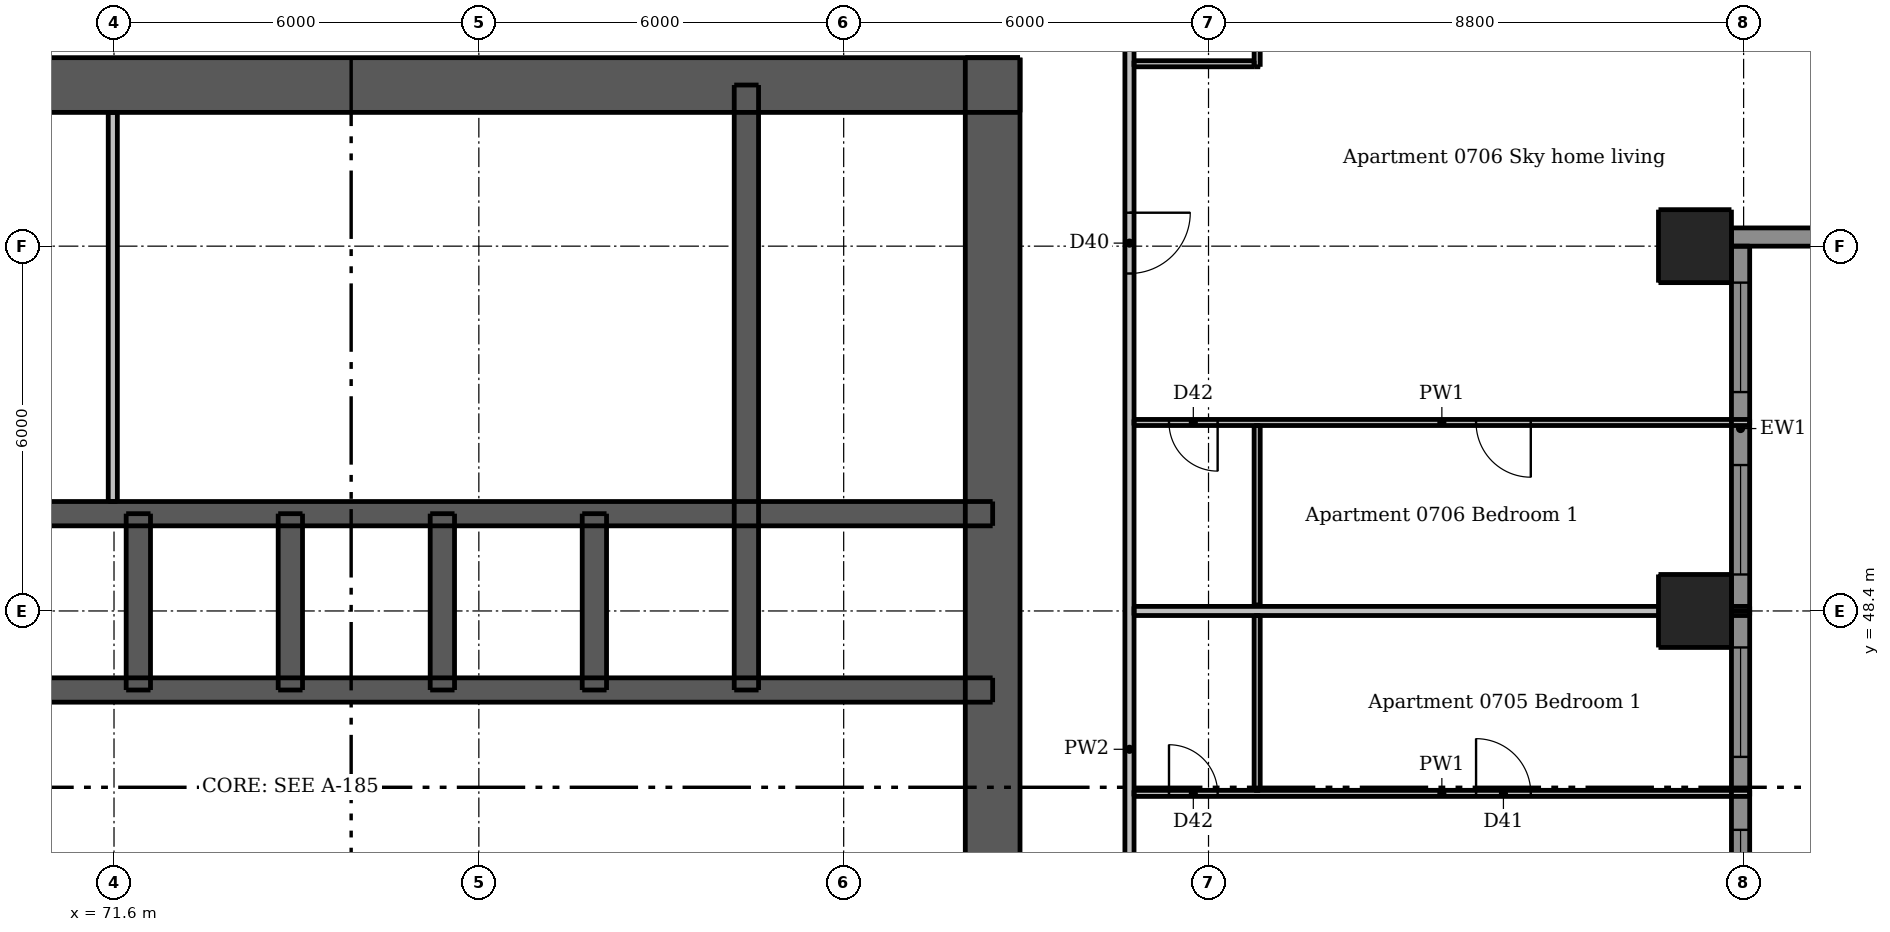
"""IFC4 building model, lengths in metres.
Left out: names, types, materials, properties, quantities, classifications, styles, units other than length and angle.
Written with IfcOpenShell. Run it as: python <this file> out.ifc"""

import sys

from ifc_helpers import new_model, si_unit, direction, frame, frame_2d, origin, origin_2d, place, context, subcontext, project, spatial, rectangle, extrude, element, fill, save


model = new_model("IFC4")
c1 = context("Model", 3, precision=1e-05, world=origin(), true_north=direction((0.0, 1.0)))
c2 = subcontext(c1, "Body", "Model", "MODEL_VIEW")
j1 = project(units=[si_unit("LENGTHUNIT", "METRE"), si_unit("PLANEANGLEUNIT", "RADIAN")], contexts=[c1])
p1 = place(None, origin())
s1 = spatial("IfcSite", under=j1, at=p1, CompositionType="ELEMENT")
p2 = place(p1, origin())
s2 = spatial("IfcBuilding", under=s1, at=p2, CompositionType="ELEMENT")
p3 = place(p2, frame((0.0, 0.0, 30.1)))
s3 = spatial("IfcBuildingStorey", under=s2, at=p3, CompositionType="ELEMENT", Elevation=30.1)
p4 = place(p3, frame((62.5, 57.05, 0.0), z_axis=(0.0, 0.0, 1.0), x_axis=(1.0, 0.0, 0.0)))
e1 = element("IfcWall", 1, at=p4, inside=s3, PredefinedType="SHEAR", context=c2, shape_type="SweptSolid", body=[
    extrude(rectangle(XDim=24.0, YDim=0.9, at=frame_2d((12.0, 0.0))), origin(), (0.0, 0.0, 1.0), 3.05),
])
p5 = place(p4, frame((20.85, 0.0, 0.0)))
e2 = element("IfcOpeningElement", 2, at=p5, cuts=e1, PredefinedType="OPENING", context=c2, shape_type="SweptSolid", body=[
    extrude(rectangle(XDim=1.1, YDim=2.1, at=frame_2d((0.55, 1.05))), frame((0.0, 0.46, 0.0), z_axis=(0.0, -1.0, 0.0), x_axis=(1.0, 0.0, 0.0)), (0.0, 0.0, 1.0), 0.92),
])
p6 = place(p4, frame((2.05, 0.0, 0.0)))
e3 = element("IfcOpeningElement", 3, at=p6, cuts=e1, PredefinedType="OPENING", context=c2, shape_type="SweptSolid", body=[
    extrude(rectangle(XDim=1.1, YDim=2.1, at=frame_2d((0.55, 1.05))), frame((0.0, 0.46, 0.0), z_axis=(0.0, -1.0, 0.0), x_axis=(1.0, 0.0, 0.0)), (0.0, 0.0, 1.0), 0.92),
])
p7 = place(p4, frame((6.44, 0.0, 0.0)))
e4 = element("IfcOpeningElement", 4, at=p7, cuts=e1, PredefinedType="OPENING", context=c2, shape_type="SweptSolid", body=[
    extrude(rectangle(XDim=0.9, YDim=2.1, at=frame_2d((0.45, 1.05))), frame((0.0, 0.46, 0.0), z_axis=(0.0, -1.0, 0.0), x_axis=(1.0, 0.0, 0.0)), (0.0, 0.0, 1.0), 0.92),
])
p8 = place(p4, frame((13.74, 0.0, 0.0)))
e5 = element("IfcOpeningElement", 5, at=p8, cuts=e1, PredefinedType="OPENING", context=c2, shape_type="SweptSolid", body=[
    extrude(rectangle(XDim=0.9, YDim=2.1, at=frame_2d((0.45, 1.05))), frame((0.0, 0.46, 0.0), z_axis=(0.0, -1.0, 0.0), x_axis=(1.0, 0.0, 0.0)), (0.0, 0.0, 1.0), 0.92),
])
p9 = place(p3, frame((86.05, 33.5, 0.0), z_axis=(0.0, 0.0, 1.0), x_axis=(0.0, 1.0, 0.0)))
e6 = element("IfcWall", 6, at=p9, inside=s3, PredefinedType="SHEAR", context=c2, shape_type="SweptSolid", body=[
    extrude(rectangle(XDim=24.0, YDim=0.9, at=frame_2d((12.0, 0.0))), origin(), (0.0, 0.0, 1.0), 3.05),
])
p10 = place(p9, frame((11.2, 0.0, 0.0)))
e7 = element("IfcOpeningElement", 7, at=p10, cuts=e6, PredefinedType="OPENING", context=c2, shape_type="SweptSolid", body=[
    extrude(rectangle(XDim=1.6, YDim=2.1, at=frame_2d((0.8, 1.05))), frame((0.0, 0.46, 0.0), z_axis=(0.0, -1.0, 0.0), x_axis=(1.0, 0.0, 0.0)), (0.0, 0.0, 1.0), 0.92),
])
p11 = place(p3, frame((62.95, 47.1, 0.0), z_axis=(0.0, 0.0, 1.0), x_axis=(1.0, 0.0, 0.0)))
e8 = element("IfcWall", 8, at=p11, inside=s3, PredefinedType="SHEAR", context=c2, shape_type="SweptSolid", body=[
    extrude(rectangle(XDim=23.1, YDim=0.4, at=frame_2d((11.55, 0.0))), origin(), (0.0, 0.0, 1.0), 3.05),
])
p12 = place(p11, frame((0.85, 0.0, 0.0)))
e9 = element("IfcOpeningElement", 9, at=p12, cuts=e8, PredefinedType="OPENING", context=c2, shape_type="SweptSolid", body=[
    extrude(rectangle(XDim=0.9, YDim=2.1, at=frame_2d((0.45, 1.05))), frame((0.0, 0.21, 0.0), z_axis=(0.0, -1.0, 0.0), x_axis=(1.0, 0.0, 0.0)), (0.0, 0.0, 1.0), 0.42),
])
p13 = place(p11, frame((2.55, 0.0, 0.0)))
e10 = element("IfcOpeningElement", 10, at=p13, cuts=e8, PredefinedType="OPENING", context=c2, shape_type="SweptSolid", body=[
    extrude(rectangle(XDim=0.9, YDim=2.1, at=frame_2d((0.45, 1.05))), frame((0.0, 0.21, 0.0), z_axis=(0.0, -1.0, 0.0), x_axis=(1.0, 0.0, 0.0)), (0.0, 0.0, 1.0), 0.42),
])
p14 = place(p11, frame((20.5, 0.0, 0.0)))
e11 = element("IfcOpeningElement", 11, at=p14, cuts=e8, PredefinedType="OPENING", context=c2, shape_type="SweptSolid", body=[
    extrude(rectangle(XDim=0.9, YDim=2.1, at=frame_2d((0.45, 1.05))), frame((0.0, 0.21, 0.0), z_axis=(0.0, -1.0, 0.0), x_axis=(1.0, 0.0, 0.0)), (0.0, 0.0, 1.0), 0.42),
])
p15 = place(p3, frame((62.95, 50.0, 0.0), z_axis=(0.0, 0.0, 1.0), x_axis=(1.0, 0.0, 0.0)))
e12 = element("IfcWall", 12, at=p15, inside=s3, PredefinedType="SHEAR", context=c2, shape_type="SweptSolid", body=[
    extrude(rectangle(XDim=23.1, YDim=0.4, at=frame_2d((11.55, 0.0))), origin(), (0.0, 0.0, 1.0), 3.05),
])
p16 = place(p3, frame((82.0, 47.1, 0.0), z_axis=(0.0, 0.0, 1.0), x_axis=(0.0, 1.0, 0.0)))
e13 = element("IfcWall", 13, at=p16, inside=s3, PredefinedType="SHEAR", context=c2, shape_type="SweptSolid", body=[
    extrude(rectangle(XDim=9.95, YDim=0.4, at=frame_2d((4.975, 0.0))), origin(), (0.0, 0.0, 1.0), 3.05),
])
for number, where, z_axis, x_axis in (
    (14, (72.0, 47.1, 0.0), (0.0, 0.0, 1.0), (0.0, 1.0, 0.0)),
    (15, (74.5, 47.1, 0.0), (0.0, 0.0, 1.0), (0.0, 1.0, 0.0)),
    (16, (77.0, 47.1, 0.0), (0.0, 0.0, 1.0), (0.0, 1.0, 0.0)),
    (17, (79.5, 47.1, 0.0), (0.0, 0.0, 1.0), (0.0, 1.0, 0.0)),
):
    element("IfcWall", number, at=place(p3, frame(where, z_axis=z_axis, x_axis=x_axis)), inside=s3, PredefinedType="SHEAR", context=c2, shape_type="SweptSolid", body=[
        extrude(rectangle(XDim=2.9, YDim=0.4, at=frame_2d((1.45, 0.0))), origin(), (0.0, 0.0, 1.0), 3.05),
    ])
for number, where, z_axis, x_axis in (
    (18, (97.6, 48.4, 0.0), (0.0, 0.0, 1.0), (1.0, 0.0, 0.0)),
    (19, (97.6, 54.4, 0.0), (0.0, 0.0, 1.0), (1.0, 0.0, 0.0)),
):
    element("IfcColumn", number, at=place(p3, frame(where, z_axis=z_axis, x_axis=x_axis)), inside=s3, PredefinedType="COLUMN", context=c2, shape_type="SweptSolid", body=[
        extrude(rectangle(XDim=1.2, YDim=1.2, at=origin_2d()), origin(), (0.0, 0.0, 1.0), 3.05),
    ])
p17 = place(p3, frame((98.2, 54.55, 0.0), z_axis=(0.0, 0.0, 1.0), x_axis=(1.0, 0.0, 0.0)))
e20 = element("IfcWall", 20, at=p17, inside=s3, PredefinedType="SOLIDWALL", context=c2, shape_type="SweptSolid", body=[
    extrude(rectangle(XDim=1.8, YDim=0.3, at=frame_2d((0.9, 0.0))), origin(), (0.0, 0.0, 1.0), 3.05),
])
p18 = place(p3, frame((98.35, 42.7, 0.0), z_axis=(0.0, 0.0, 1.0), x_axis=(0.0, 1.0, 0.0)))
e21 = element("IfcWall", 21, at=p18, inside=s3, PredefinedType="SOLIDWALL", context=c2, shape_type="SweptSolid", body=[
    extrude(rectangle(XDim=5.7, YDim=0.3, at=frame_2d((2.85, 0.0))), origin(), (0.0, 0.0, 1.0), 3.05),
])
p19 = place(p18, frame((0.3, 0.0, 0.15)))
e22 = element("IfcOpeningElement", 22, at=p19, cuts=e21, PredefinedType="OPENING", context=c2, shape_type="SweptSolid", body=[
    extrude(rectangle(XDim=1.8, YDim=2.1, at=frame_2d((0.9, 1.05))), frame((0.0, 0.16, 0.0), z_axis=(0.0, -1.0, 0.0), x_axis=(1.0, 0.0, 0.0)), (0.0, 0.0, 1.0), 0.32),
])
p20 = place(p18, frame((3.3, 0.0, 0.15)))
e23 = element("IfcOpeningElement", 23, at=p20, cuts=e21, PredefinedType="OPENING", context=c2, shape_type="SweptSolid", body=[
    extrude(rectangle(XDim=1.8, YDim=2.1, at=frame_2d((0.9, 1.05))), frame((0.0, 0.16, 0.0), z_axis=(0.0, -1.0, 0.0), x_axis=(1.0, 0.0, 0.0)), (0.0, 0.0, 1.0), 0.32),
])
p21 = place(p3, frame((98.35, 48.4, 0.0), z_axis=(0.0, 0.0, 1.0), x_axis=(0.0, 1.0, 0.0)))
e24 = element("IfcWall", 24, at=p21, inside=s3, PredefinedType="SOLIDWALL", context=c2, shape_type="SweptSolid", body=[
    extrude(rectangle(XDim=6.0, YDim=0.3, at=frame_2d((3.0, 0.0))), origin(), (0.0, 0.0, 1.0), 3.05),
])
p22 = place(p21, frame((0.6, 0.0, 0.15)))
e25 = element("IfcOpeningElement", 25, at=p22, cuts=e24, PredefinedType="OPENING", context=c2, shape_type="SweptSolid", body=[
    extrude(rectangle(XDim=1.8, YDim=2.1, at=frame_2d((0.9, 1.05))), frame((0.0, 0.16, 0.0), z_axis=(0.0, -1.0, 0.0), x_axis=(1.0, 0.0, 0.0)), (0.0, 0.0, 1.0), 0.32),
])
p23 = place(p21, frame((3.6, 0.0, 0.15)))
e26 = element("IfcOpeningElement", 26, at=p23, cuts=e24, PredefinedType="OPENING", context=c2, shape_type="SweptSolid", body=[
    extrude(rectangle(XDim=1.8, YDim=2.1, at=frame_2d((0.9, 1.05))), frame((0.0, 0.16, 0.0), z_axis=(0.0, -1.0, 0.0), x_axis=(1.0, 0.0, 0.0)), (0.0, 0.0, 1.0), 0.32),
])
p24 = place(p3, frame((71.58, 50.2, 0.0), z_axis=(0.0, 0.0, 1.0), x_axis=(0.0, 1.0, 0.0)))
e27 = element("IfcWall", 27, at=p24, inside=s3, PredefinedType="PLUMBINGWALL", context=c2, shape_type="SweptSolid", body=[
    extrude(rectangle(XDim=6.4, YDim=0.15, at=frame_2d((3.2, 0.0))), origin(), (0.0, 0.0, 1.0), 3.05),
])
p25 = place(p3, frame((90.4, 45.45, 0.0), z_axis=(0.0, 0.0, 1.0), x_axis=(0.0, 1.0, 0.0)))
e28 = element("IfcWall", 28, at=p25, inside=s3, PredefinedType="PARTITIONING", context=c2, shape_type="SweptSolid", body=[
    extrude(rectangle(XDim=2.875, YDim=0.1, at=frame_2d((1.438, 0.0))), origin(), (0.0, 0.0, 1.0), 3.05),
])
p26 = place(p3, frame((90.4, 48.5, 0.0), z_axis=(0.0, 0.0, 1.0), x_axis=(0.0, 1.0, 0.0)))
e29 = element("IfcWall", 29, at=p26, inside=s3, PredefinedType="PARTITIONING", context=c2, shape_type="SweptSolid", body=[
    extrude(rectangle(XDim=2.95, YDim=0.1, at=frame_2d((1.475, 0.0))), origin(), (0.0, 0.0, 1.0), 3.05),
])
p27 = place(p3, frame((90.4, 57.35, 0.0), z_axis=(0.0, 0.0, 1.0), x_axis=(0.0, 1.0, 0.0)))
e30 = element("IfcWall", 30, at=p27, inside=s3, PredefinedType="PARTITIONING", context=c2, shape_type="SweptSolid", body=[
    extrude(rectangle(XDim=2.975, YDim=0.1, at=frame_2d((1.487, 0.0))), origin(), (0.0, 0.0, 1.0), 3.05),
])
p28 = place(p27, frame((1.1, 0.0, 0.0)))
e31 = element("IfcOpeningElement", 31, at=p28, cuts=e30, PredefinedType="OPENING", context=c2, shape_type="SweptSolid", body=[
    extrude(rectangle(XDim=0.9, YDim=2.1, at=frame_2d((0.45, 1.05))), frame((0.0, 0.06, 0.0), z_axis=(0.0, -1.0, 0.0), x_axis=(1.0, 0.0, 0.0)), (0.0, 0.0, 1.0), 0.12),
])
p29 = place(p3, frame((88.375, 57.4, 0.0), z_axis=(0.0, 0.0, 1.0), x_axis=(1.0, 0.0, 0.0)))
e32 = element("IfcWall", 32, at=p29, inside=s3, PredefinedType="PARTITIONING", context=c2, shape_type="SweptSolid", body=[
    extrude(rectangle(XDim=1.975, YDim=0.1, at=frame_2d((0.988, 0.0))), origin(), (0.0, 0.0, 1.0), 3.05),
])
p30 = place(p3, frame((98.5, 51.5, 0.0), z_axis=(0.0, 0.0, 1.0), x_axis=(-1.0, 0.0, 0.0)))
e33 = element("IfcWall", 33, at=p30, inside=s3, PredefinedType="PARTITIONING", context=c2, shape_type="SweptSolid", body=[
    extrude(rectangle(XDim=10.125, YDim=0.1, at=frame_2d((5.062, 0.0))), origin(), (0.0, 0.0, 1.0), 3.05),
])
p31 = place(p30, frame((3.6, 0.0, 0.0)))
e34 = element("IfcOpeningElement", 34, at=p31, cuts=e33, PredefinedType="OPENING", context=c2, shape_type="SweptSolid", body=[
    extrude(rectangle(XDim=0.9, YDim=2.1, at=frame_2d((0.45, 1.05))), frame((0.0, 0.06, 0.0), z_axis=(0.0, -1.0, 0.0), x_axis=(1.0, 0.0, 0.0)), (0.0, 0.0, 1.0), 0.12),
])
p32 = place(p30, frame((8.75, 0.0, 0.0)))
e35 = element("IfcOpeningElement", 35, at=p32, cuts=e33, PredefinedType="OPENING", context=c2, shape_type="SweptSolid", body=[
    extrude(rectangle(XDim=0.8, YDim=2.1, at=frame_2d((0.4, 1.05))), frame((0.0, 0.06, 0.0), z_axis=(0.0, -1.0, 0.0), x_axis=(1.0, 0.0, 0.0)), (0.0, 0.0, 1.0), 0.12),
])
p33 = place(p3, frame((88.375, 45.4, 0.0), z_axis=(0.0, 0.0, 1.0), x_axis=(1.0, 0.0, 0.0)))
e36 = element("IfcWall", 36, at=p33, inside=s3, PredefinedType="PARTITIONING", context=c2, shape_type="SweptSolid", body=[
    extrude(rectangle(XDim=10.125, YDim=0.1, at=frame_2d((5.062, 0.0))), origin(), (0.0, 0.0, 1.0), 3.05),
])
p34 = place(p33, frame((5.625, 0.0, 0.0)))
e37 = element("IfcOpeningElement", 37, at=p34, cuts=e36, PredefinedType="OPENING", context=c2, shape_type="SweptSolid", body=[
    extrude(rectangle(XDim=0.9, YDim=2.1, at=frame_2d((0.45, 1.05))), frame((0.0, 0.06, 0.0), z_axis=(0.0, -1.0, 0.0), x_axis=(1.0, 0.0, 0.0)), (0.0, 0.0, 1.0), 0.12),
])
p35 = place(p33, frame((0.575, 0.0, 0.0)))
e38 = element("IfcOpeningElement", 38, at=p35, cuts=e36, PredefinedType="OPENING", context=c2, shape_type="SweptSolid", body=[
    extrude(rectangle(XDim=0.8, YDim=2.1, at=frame_2d((0.4, 1.05))), frame((0.0, 0.06, 0.0), z_axis=(0.0, -1.0, 0.0), x_axis=(1.0, 0.0, 0.0)), (0.0, 0.0, 1.0), 0.12),
])
p36 = place(p3, frame((88.3, 60.475, 0.0), z_axis=(0.0, 0.0, 1.0), x_axis=(0.0, -1.0, 0.0)))
e39 = element("IfcWall", 39, at=p36, inside=s3, PredefinedType="PARTITIONING", context=c2, shape_type="SweptSolid", body=[
    extrude(rectangle(XDim=28.7, YDim=0.15, at=frame_2d((14.35, 0.0))), origin(), (0.0, 0.0, 1.0), 3.05),
])
p37 = place(p36, frame((27.425, 0.0, 0.0)))
e40 = element("IfcOpeningElement", 40, at=p37, cuts=e39, PredefinedType="OPENING", context=c2, shape_type="SweptSolid", body=[
    extrude(rectangle(XDim=1.0, YDim=2.1, at=frame_2d((0.5, 1.05))), frame((0.0, 0.085, 0.0), z_axis=(0.0, -1.0, 0.0), x_axis=(1.0, 0.0, 0.0)), (0.0, 0.0, 1.0), 0.17),
])
p38 = place(p36, frame((16.325, 0.0, 0.0)))
e41 = element("IfcOpeningElement", 41, at=p38, cuts=e39, PredefinedType="OPENING", context=c2, shape_type="SweptSolid", body=[
    extrude(rectangle(XDim=1.0, YDim=2.1, at=frame_2d((0.5, 1.05))), frame((0.0, 0.085, 0.0), z_axis=(0.0, -1.0, 0.0), x_axis=(1.0, 0.0, 0.0)), (0.0, 0.0, 1.0), 0.17),
])
p39 = place(p36, frame((5.525, 0.0, 0.0)))
e42 = element("IfcOpeningElement", 42, at=p39, cuts=e39, PredefinedType="OPENING", context=c2, shape_type="SweptSolid", body=[
    extrude(rectangle(XDim=1.0, YDim=2.1, at=frame_2d((0.5, 1.05))), frame((0.0, 0.085, 0.0), z_axis=(0.0, -1.0, 0.0), x_axis=(1.0, 0.0, 0.0)), (0.0, 0.0, 1.0), 0.17),
])
p40 = place(p3, frame((88.375, 48.4, 0.0), z_axis=(0.0, 0.0, 1.0), x_axis=(1.0, 0.0, 0.0)))
e43 = element("IfcWall", 43, at=p40, inside=s3, PredefinedType="PARTITIONING", context=c2, shape_type="SweptSolid", body=[
    extrude(rectangle(XDim=10.125, YDim=0.15, at=frame_2d((5.062, 0.0))), origin(), (0.0, 0.0, 1.0), 2.516),
])
p41 = place(p19, origin())
e44 = element("IfcWindow", 44, at=p41, inside=s3, PartitioningType="DOUBLE_PANEL_VERTICAL", PredefinedType="WINDOW", context=c2, shape_type="SweptSolid", body=[
    extrude(rectangle(XDim=1.8, YDim=2.1, at=frame_2d((0.9, 1.05))), frame((0.0, 0.03, 0.0), z_axis=(0.0, -1.0, 0.0), x_axis=(1.0, 0.0, 0.0)), (0.0, 0.0, 1.0), 0.06),
])
fill(e22, e44)
p42 = place(p20, origin())
e45 = element("IfcWindow", 45, at=p42, inside=s3, PartitioningType="DOUBLE_PANEL_VERTICAL", PredefinedType="WINDOW", context=c2, shape_type="SweptSolid", body=[
    extrude(rectangle(XDim=1.8, YDim=2.1, at=frame_2d((0.9, 1.05))), frame((0.0, 0.03, 0.0), z_axis=(0.0, -1.0, 0.0), x_axis=(1.0, 0.0, 0.0)), (0.0, 0.0, 1.0), 0.06),
])
fill(e23, e45)
p43 = place(p22, origin())
e46 = element("IfcWindow", 46, at=p43, inside=s3, PartitioningType="DOUBLE_PANEL_VERTICAL", PredefinedType="WINDOW", context=c2, shape_type="SweptSolid", body=[
    extrude(rectangle(XDim=1.8, YDim=2.1, at=frame_2d((0.9, 1.05))), frame((0.0, 0.03, 0.0), z_axis=(0.0, -1.0, 0.0), x_axis=(1.0, 0.0, 0.0)), (0.0, 0.0, 1.0), 0.06),
])
fill(e25, e46)
p44 = place(p23, origin())
e47 = element("IfcWindow", 47, at=p44, inside=s3, PartitioningType="DOUBLE_PANEL_VERTICAL", PredefinedType="WINDOW", context=c2, shape_type="SweptSolid", body=[
    extrude(rectangle(XDim=1.8, YDim=2.1, at=frame_2d((0.9, 1.05))), frame((0.0, 0.03, 0.0), z_axis=(0.0, -1.0, 0.0), x_axis=(1.0, 0.0, 0.0)), (0.0, 0.0, 1.0), 0.06),
])
fill(e26, e47)
p45 = place(p5, origin())
e48 = element("IfcDoor", 48, at=p45, inside=s3, OperationType="SINGLE_SWING_RIGHT", PredefinedType="DOOR", context=c2, shape_type="SweptSolid", body=[
    extrude(rectangle(XDim=1.1, YDim=2.1, at=frame_2d((0.55, 1.05))), frame((0.0, -0.388, 0.0), z_axis=(0.0, -1.0, 0.0), x_axis=(1.0, 0.0, 0.0)), (0.0, 0.0, 1.0), 0.05),
])
fill(e2, e48)
p46 = place(p10, origin())
e49 = element("IfcDoor", 49, at=p46, inside=s3, OperationType="DOUBLE_DOOR_SINGLE_SWING", PredefinedType="DOOR", context=c2, shape_type="SweptSolid", body=[
    extrude(rectangle(XDim=1.6, YDim=2.1, at=frame_2d((0.8, 1.05))), frame((0.0, 0.438, 0.0), z_axis=(0.0, -1.0, 0.0), x_axis=(1.0, 0.0, 0.0)), (0.0, 0.0, 1.0), 0.05),
])
fill(e7, e49)
p47 = place(p14, origin())
e50 = element("IfcDoor", 50, at=p47, inside=s3, OperationType="SINGLE_SWING_LEFT", PredefinedType="DOOR", context=c2, shape_type="SweptSolid", body=[
    extrude(rectangle(XDim=0.9, YDim=2.1, at=frame_2d((0.45, 1.05))), frame((0.0, 0.188, 0.0), z_axis=(0.0, -1.0, 0.0), x_axis=(1.0, 0.0, 0.0)), (0.0, 0.0, 1.0), 0.05),
])
fill(e11, e50)
p48 = place(p8, origin())
e51 = element("IfcDoor", 51, at=p48, inside=s3, OperationType="SINGLE_SWING_RIGHT", PredefinedType="DOOR", context=c2, shape_type="SweptSolid", body=[
    extrude(rectangle(XDim=0.9, YDim=2.1, at=frame_2d((0.45, 1.05))), frame((0.0, -0.388, 0.0), z_axis=(0.0, -1.0, 0.0), x_axis=(1.0, 0.0, 0.0)), (0.0, 0.0, 1.0), 0.05),
])
fill(e5, e51)
p49 = place(p34, origin())
e52 = element("IfcDoor", 52, at=p49, inside=s3, OperationType="SINGLE_SWING_LEFT", PredefinedType="DOOR", context=c2, shape_type="SweptSolid", body=[
    extrude(rectangle(XDim=0.9, YDim=2.1, at=frame_2d((0.45, 1.05))), frame((0.0, 0.025, 0.0), z_axis=(0.0, -1.0, 0.0), x_axis=(1.0, 0.0, 0.0)), (0.0, 0.0, 1.0), 0.05),
])
fill(e37, e52)
p50 = place(p35, origin())
e53 = element("IfcDoor", 53, at=p50, inside=s3, OperationType="SINGLE_SWING_LEFT", PredefinedType="DOOR", context=c2, shape_type="SweptSolid", body=[
    extrude(rectangle(XDim=0.8, YDim=2.1, at=frame_2d((0.4, 1.05))), frame((0.0, 0.025, 0.0), z_axis=(0.0, -1.0, 0.0), x_axis=(1.0, 0.0, 0.0)), (0.0, 0.0, 1.0), 0.05),
])
fill(e38, e53)
p51 = place(p39, origin())
e54 = element("IfcDoor", 54, at=p51, inside=s3, OperationType="SINGLE_SWING_LEFT", PredefinedType="DOOR", context=c2, shape_type="SweptSolid", body=[
    extrude(rectangle(XDim=1.0, YDim=2.1, at=frame_2d((0.5, 1.05))), frame((0.0, 0.025, 0.0), z_axis=(0.0, -1.0, 0.0), x_axis=(1.0, 0.0, 0.0)), (0.0, 0.0, 1.0), 0.05),
])
fill(e42, e54)
p52 = place(p31, origin())
e55 = element("IfcDoor", 55, at=p52, inside=s3, OperationType="SINGLE_SWING_LEFT", PredefinedType="DOOR", context=c2, shape_type="SweptSolid", body=[
    extrude(rectangle(XDim=0.9, YDim=2.1, at=frame_2d((0.45, 1.05))), frame((0.0, 0.025, 0.0), z_axis=(0.0, -1.0, 0.0), x_axis=(1.0, 0.0, 0.0)), (0.0, 0.0, 1.0), 0.05),
])
fill(e34, e55)
p53 = place(p32, origin())
e56 = element("IfcDoor", 56, at=p53, inside=s3, OperationType="SINGLE_SWING_LEFT", PredefinedType="DOOR", context=c2, shape_type="SweptSolid", body=[
    extrude(rectangle(XDim=0.8, YDim=2.1, at=frame_2d((0.4, 1.05))), frame((0.0, 0.025, 0.0), z_axis=(0.0, -1.0, 0.0), x_axis=(1.0, 0.0, 0.0)), (0.0, 0.0, 1.0), 0.05),
])
fill(e35, e56)
save(model, sys.argv[1])
